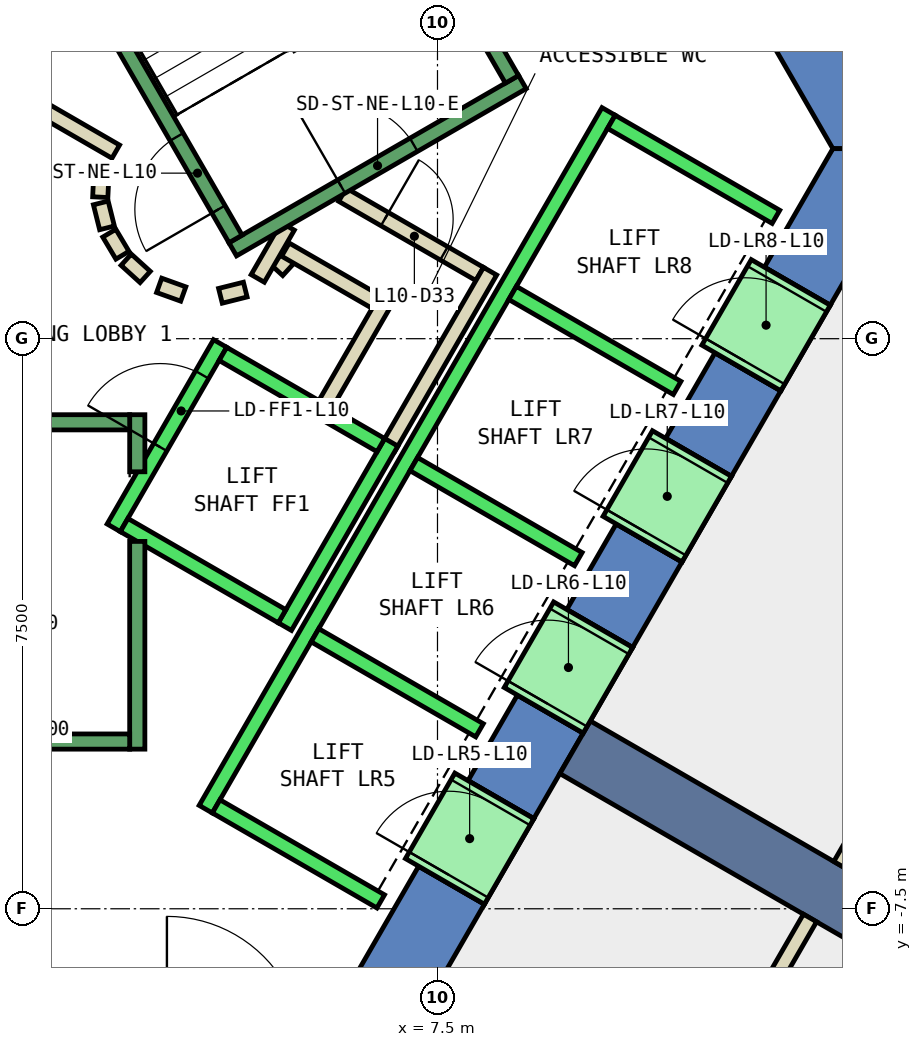
"""IFC4 building model, lengths in metres.
Left out: names, types, materials, properties, quantities, classifications, styles, units other than length and angle.
Written with IfcOpenShell. Run it as: python <this file> out.ifc"""

import sys

from ifc_helpers import new_model, si_unit, direction, frame, frame_2d, origin, place, context, subcontext, project, spatial, polyline, rectangle, outline, extrude, element, fill, save


model = new_model("IFC4")
c1 = context("Model", 3, precision=1e-05, world=origin(), true_north=direction((0.0, 1.0)))
c2 = subcontext(c1, "Body", "Model", "MODEL_VIEW")
j1 = project(units=[si_unit("LENGTHUNIT", "METRE"), si_unit("PLANEANGLEUNIT", "RADIAN")], contexts=[c1])
p1 = place(None, origin())
s1 = spatial("IfcSite", under=j1, at=p1, CompositionType="ELEMENT")
p2 = place(p1, origin())
s2 = spatial("IfcBuilding", under=s1, at=p2, CompositionType="ELEMENT")
p3 = place(p2, frame((0.0, 0.0, 51.8)))
s3 = spatial("IfcBuildingStorey", under=s2, at=p3, CompositionType="ELEMENT", Elevation=51.8)
p4 = place(p3, frame((0.0, 0.0, -0.4)))
e1 = element("IfcWall", 1, at=p4, inside=s3, PredefinedType="SHEAR", context=c2, shape_type="SweptSolid", body=[
    extrude(outline(polyline([(8.517, 11.748), (7.651, 11.248), (12.702, 2.5), (13.856, 2.5), (8.517, 11.748)])), origin(), (0.0, 0.0, 1.0), 4.2),
])
p5 = place(p3, frame((0.0, 0.0, -0.4)))
e2 = element("IfcWall", 2, at=p5, inside=s3, PredefinedType="SHEAR", context=c2, shape_type="SweptSolid", body=[
    extrude(outline(polyline([(8.117, -7.44), (7.252, -6.94), (6.351, -8.5), (6.928, -9.5), (8.117, -7.44)])), origin(), (0.0, 0.0, 1.0), 4.2),
])
p6 = place(p3, frame((0.0, 0.0, -0.4)))
e3 = element("IfcWall", 3, at=p6, inside=s3, PredefinedType="SHEAR", context=c2, shape_type="SweptSolid", body=[
    extrude(outline(polyline([(9.417, -5.189), (8.551, -4.689), (7.902, -5.814), (8.767, -6.314), (9.417, -5.189)])), origin(), (0.0, 0.0, 1.0), 4.2),
])
p7 = place(p3, frame((0.0, 0.0, -0.4)))
e4 = element("IfcWall", 4, at=p7, inside=s3, PredefinedType="SHEAR", context=c2, shape_type="SweptSolid", body=[
    extrude(outline(polyline([(10.717, -2.937), (9.851, -2.437), (9.201, -3.563), (10.067, -4.063), (10.717, -2.937)])), origin(), (0.0, 0.0, 1.0), 4.2),
])
p8 = place(p3, frame((0.0, 0.0, -0.4)))
e5 = element("IfcWall", 5, at=p8, inside=s3, PredefinedType="SHEAR", context=c2, shape_type="SweptSolid", body=[
    extrude(outline(polyline([(12.017, -0.686), (11.151, -0.186), (10.501, -1.311), (11.367, -1.811), (12.017, -0.686)])), origin(), (0.0, 0.0, 1.0), 4.2),
])
p9 = place(p3, frame((0.0, 0.0, -0.4)))
e6 = element("IfcWall", 6, at=p9, inside=s3, PredefinedType="SHEAR", context=c2, shape_type="SweptSolid", body=[
    extrude(outline(polyline([(11.801, 0.94), (12.667, 0.44), (13.856, 2.5), (12.702, 2.5), (11.801, 0.94)])), origin(), (0.0, 0.0, 1.0), 4.2),
])
p10 = place(p3, frame((0.0, 0.0, 3.6)))
e7 = element("IfcWall", 7, at=p10, inside=s3, PredefinedType="SHEAR", context=c2, shape_type="SweptSolid", body=[
    extrude(outline(polyline([(8.767, -6.314), (7.902, -5.814), (7.252, -6.94), (8.117, -7.44), (8.767, -6.314)])), origin(), (0.0, 0.0, 1.0), 0.2),
])
p11 = place(p3, frame((0.0, 0.0, 3.6)))
e8 = element("IfcWall", 8, at=p11, inside=s3, PredefinedType="SHEAR", context=c2, shape_type="SweptSolid", body=[
    extrude(outline(polyline([(10.067, -4.063), (9.201, -3.563), (8.551, -4.689), (9.417, -5.189), (10.067, -4.063)])), origin(), (0.0, 0.0, 1.0), 0.2),
])
p12 = place(p3, frame((0.0, 0.0, 3.6)))
e9 = element("IfcWall", 9, at=p12, inside=s3, PredefinedType="SHEAR", context=c2, shape_type="SweptSolid", body=[
    extrude(outline(polyline([(11.367, -1.811), (10.501, -1.311), (9.851, -2.437), (10.717, -2.937), (11.367, -1.811)])), origin(), (0.0, 0.0, 1.0), 0.2),
])
p13 = place(p3, frame((0.0, 0.0, 3.6)))
e10 = element("IfcWall", 10, at=p13, inside=s3, PredefinedType="SHEAR", context=c2, shape_type="SweptSolid", body=[
    extrude(outline(polyline([(12.667, 0.44), (11.801, 0.94), (11.151, -0.186), (12.017, -0.686), (12.667, 0.44)])), origin(), (0.0, 0.0, 1.0), 0.2),
])
p14 = place(p3, frame((9.31, -5.375, -0.4), z_axis=(0.0, 0.0, 1.0), x_axis=(0.866017533419, -0.500013631625, 0.0)))
e11 = element("IfcWall", 11, at=p14, inside=s3, PredefinedType="SHEAR", context=c2, shape_type="SweptSolid", body=[
    extrude(rectangle(XDim=9.0, YDim=0.8, at=frame_2d((4.5, 0.0))), origin(), (0.0, 0.0, 1.0), 4.2),
])
p15 = place(p3, frame((5.39, 0.898, 0.0), z_axis=(0.0, 0.0, 1.0), x_axis=(0.673828488714, 0.738887791073, 0.0)))
e12 = element("IfcWall", 12, at=p15, inside=s3, PredefinedType="PARTITIONING", context=c2, shape_type="SweptSolid", body=[
    extrude(rectangle(XDim=0.263, YDim=0.2, at=frame_2d((0.131, 0.0))), origin(), (0.0, 0.0, 1.0), 3.8),
])
p16 = place(p3, frame((5.499, 1.172, 0.0), z_axis=(0.0, 0.0, 1.0), x_axis=(0.866333505267, -0.499465972466, 0.0)))
e13 = element("IfcWall", 13, at=p16, inside=s3, PredefinedType="PARTITIONING", context=c2, shape_type="SweptSolid", body=[
    extrude(rectangle(XDim=1.374, YDim=0.2, at=frame_2d((0.687, 0.0))), origin(), (0.0, 0.0, 1.0), 3.8),
])
p17 = place(p3, frame((6.826, 0.522, 0.0), z_axis=(0.0, 0.0, 1.0), x_axis=(-0.500016722714, -0.866015748706, 0.0)))
e14 = element("IfcWall", 14, at=p17, inside=s3, PredefinedType="PARTITIONING", context=c2, shape_type="SweptSolid", body=[
    extrude(rectangle(XDim=1.7, YDim=0.2, at=frame_2d((0.85, 0.0))), origin(), (0.0, 0.0, 1.0), 3.8),
])
p18 = place(p3, frame((6.25, 1.894, 0.0), z_axis=(0.0, 0.0, 1.0), x_axis=(0.866043184279, -0.499969202016, 0.0)))
e15 = element("IfcWall", 15, at=p18, inside=s3, PredefinedType="PARTITIONING", context=c2, shape_type="SweptSolid", body=[
    extrude(rectangle(XDim=2.084, YDim=0.2, at=frame_2d((1.042, 0.0))), origin(), (0.0, 0.0, 1.0), 3.8),
])
p19 = place(p18, frame((0.642, 0.0, 0.0)))
e16 = element("IfcOpeningElement", 16, at=p19, cuts=e15, PredefinedType="OPENING", context=c2, shape_type="SweptSolid", body=[
    extrude(rectangle(XDim=0.9, YDim=2.1, at=frame_2d((0.45, 1.05))), frame((0.0, 0.11, 0.0), z_axis=(0.0, -1.0, 0.0), x_axis=(1.0, 0.0, 0.0)), (0.0, 0.0, 1.0), 0.22),
])
p20 = place(p3, frame((8.192, 0.888, 0.0), z_axis=(0.0, 0.0, 1.0), x_axis=(-0.499940625693, -0.866059680843, 0.0)))
e17 = element("IfcWall", 17, at=p20, inside=s3, PredefinedType="PARTITIONING", context=c2, shape_type="SweptSolid", body=[
    extrude(rectangle(XDim=2.68, YDim=0.2, at=frame_2d((1.34, 0.0))), origin(), (0.0, 0.0, 1.0), 3.8),
])
p21 = place(p3, frame((5.135, 0.793, 0.0), z_axis=(0.0, 0.0, 1.0), x_axis=(0.499526442893, 0.866298639529, 0.0)))
e18 = element("IfcWall", 18, at=p21, inside=s3, PredefinedType="PARTITIONING", context=c2, shape_type="SweptSolid", body=[
    extrude(rectangle(XDim=0.791, YDim=0.2, at=frame_2d((0.396, 0.0))), origin(), (0.0, 0.0, 1.0), 3.8),
])
p22 = place(p3, frame((2.012, 3.186, 0.0), z_axis=(0.0, 0.0, 1.0), x_axis=(0.865891012941, -0.500232699559, 0.0)))
e19 = element("IfcWall", 19, at=p22, inside=s3, PredefinedType="PARTITIONING", context=c2, shape_type="SweptSolid", body=[
    extrude(rectangle(XDim=1.449, YDim=0.2, at=frame_2d((0.725, 0.0))), origin(), (0.0, 0.0, 1.0), 3.8),
])
p23 = place(p3, frame((3.079, 2.199, 0.0), z_axis=(0.0, 0.0, 1.0), x_axis=(-0.047771483479, -0.998858290933, 0.0)))
e20 = element("IfcWall", 20, at=p23, inside=s3, PredefinedType="PARTITIONING", context=c2, shape_type="SweptSolid", body=[
    extrude(rectangle(XDim=0.337, YDim=0.2, at=frame_2d((0.169, 0.0))), origin(), (0.0, 0.0, 1.0), 3.8),
])
p24 = place(p3, frame((3.07, 1.786, 0.0), z_axis=(0.0, 0.0, 1.0), x_axis=(0.242705583207, -0.970099994784, 0.0)))
e21 = element("IfcWall", 21, at=p24, inside=s3, PredefinedType="PARTITIONING", context=c2, shape_type="SweptSolid", body=[
    extrude(rectangle(XDim=0.338, YDim=0.2, at=frame_2d((0.169, 0.0))), origin(), (0.0, 0.0, 1.0), 3.8),
])
for number, where, z_axis, x_axis in (
    (22, (3.182, 1.388, 0.0), (0.0, 0.0, 1.0), (0.512, -0.859, 0.0)),
    (23, (3.404, 1.039, 0.0), (0.0, 0.0, 1.0), (0.74, -0.672, 0.0)),
):
    element("IfcWall", number, at=place(p3, frame(where, z_axis=z_axis, x_axis=x_axis)), inside=s3, PredefinedType="PARTITIONING", context=c2, shape_type="SweptSolid", body=[
        extrude(rectangle(XDim=0.338, YDim=0.2, at=frame_2d((0.169, 0.0))), origin(), (0.0, 0.0, 1.0), 3.8),
    ])
p25 = place(p3, frame((3.838, 0.702, 0.0), z_axis=(0.0, 0.0, 1.0), x_axis=(0.941035081519, -0.338308993895, 0.0)))
e24 = element("IfcWall", 24, at=p25, inside=s3, PredefinedType="PARTITIONING", context=c2, shape_type="SweptSolid", body=[
    extrude(rectangle(XDim=0.337, YDim=0.2, at=frame_2d((0.168, 0.0))), origin(), (0.0, 0.0, 1.0), 3.8),
])
p26 = place(p3, frame((4.644, 0.564, 0.0), z_axis=(0.0, 0.0, 1.0), x_axis=(0.969929076366, 0.243387729394, 0.0)))
e25 = element("IfcWall", 25, at=p26, inside=s3, PredefinedType="PARTITIONING", context=c2, shape_type="SweptSolid", body=[
    extrude(rectangle(XDim=0.337, YDim=0.2, at=frame_2d((0.168, 0.0))), origin(), (0.0, 0.0, 1.0), 3.8),
])
p27 = place(p3, frame((19.257, 4.255, 0.0), z_axis=(0.0, 0.0, 1.0), x_axis=(-0.499978317034, -0.866037922089, 0.0)))
e26 = element("IfcWall", 26, at=p27, inside=s3, PredefinedType="PARTITIONING", context=c2, shape_type="SweptSolid", body=[
    extrude(rectangle(XDim=12.913, YDim=0.2, at=frame_2d((6.456, 0.0))), origin(), (0.0, 0.0, 1.0), 3.8),
])
p28 = place(p3, frame((12.401, -7.621, 0.0), z_axis=(0.0, 0.0, 1.0), x_axis=(-0.499983724212, -0.866034800411, 0.0)))
e27 = element("IfcWall", 27, at=p28, inside=s3, PredefinedType="PARTITIONING", context=c2, shape_type="SweptSolid", body=[
    extrude(rectangle(XDim=9.302, YDim=0.2, at=frame_2d((4.651, 0.0))), origin(), (0.0, 0.0, 1.0), 3.8),
])
p29 = place(p3, frame((3.24, -2.488, 0.0), z_axis=(0.0, 0.0, 1.0), x_axis=(0.49994636267, 0.866056369097, 0.0)))
e28 = element("IfcWall", 28, at=p29, inside=s3, PredefinedType="STANDARD", context=c2, shape_type="SweptSolid", body=[
    extrude(rectangle(XDim=2.8, YDim=0.2, at=frame_2d((1.4, 0.0))), origin(), (0.0, 0.0, 1.0), 3.8),
])
p30 = place(p29, frame((1.225, 0.0, 0.0)))
e29 = element("IfcOpeningElement", 29, at=p30, cuts=e28, PredefinedType="OPENING", context=c2, shape_type="SweptSolid", body=[
    extrude(rectangle(XDim=1.1, YDim=2.1, at=frame_2d((0.55, 1.05))), frame((0.0, 0.11, 0.0), z_axis=(0.0, -1.0, 0.0), x_axis=(1.0, 0.0, 0.0)), (0.0, 0.0, 1.0), 0.22),
])
p31 = place(p3, frame((5.492, -3.788, 0.0), z_axis=(0.0, 0.0, 1.0), x_axis=(0.500011755427, 0.866018616679, 0.0)))
e30 = element("IfcWall", 30, at=p31, inside=s3, PredefinedType="STANDARD", context=c2, shape_type="SweptSolid", body=[
    extrude(rectangle(XDim=2.8, YDim=0.2, at=frame_2d((1.4, 0.0))), origin(), (0.0, 0.0, 1.0), 3.8),
])
p32 = place(p3, frame((3.377, -2.452, 0.0), z_axis=(0.0, 0.0, 1.0), x_axis=(0.865955154139, -0.50012165622, 0.0)))
e31 = element("IfcWall", 31, at=p32, inside=s3, PredefinedType="STANDARD", context=c2, shape_type="SweptSolid", body=[
    extrude(rectangle(XDim=2.4, YDim=0.2, at=frame_2d((1.2, 0.0))), origin(), (0.0, 0.0, 1.0), 3.8),
])
p33 = place(p3, frame((4.677, -0.2, 0.0), z_axis=(0.0, 0.0, 1.0), x_axis=(0.865973769406, -0.500089422704, 0.0)))
e32 = element("IfcWall", 32, at=p33, inside=s3, PredefinedType="STANDARD", context=c2, shape_type="SweptSolid", body=[
    extrude(rectangle(XDim=2.399, YDim=0.2, at=frame_2d((1.2, 0.0))), origin(), (0.0, 0.0, 1.0), 3.8),
])
p34 = place(p3, frame((4.451, -6.19, 0.0), z_axis=(0.0, 0.0, 1.0), x_axis=(0.50000090737, 0.866024879913, 0.0)))
e33 = element("IfcWall", 33, at=p34, inside=s3, PredefinedType="STANDARD", context=c2, shape_type="SweptSolid", body=[
    extrude(rectangle(XDim=10.6, YDim=0.2, at=frame_2d((5.3, 0.0))), origin(), (0.0, 0.0, 1.0), 3.8),
])
for number, where, z_axis, x_axis in (
    (34, (4.588, -6.153, 0.0), (0.0, 0.0, 1.0), (0.866, -0.5, 0.0)),
    (35, (5.888, -3.902, 0.0), (0.0, 0.0, 1.0), (0.866, -0.5, 0.0)),
    (36, (7.188, -1.65, 0.0), (0.0, 0.0, 1.0), (0.866, -0.5, 0.0)),
    (37, (8.488, 0.602, 0.0), (0.0, 0.0, 1.0), (0.866, -0.5, 0.0)),
):
    element("IfcWall", number, at=place(p3, frame(where, z_axis=z_axis, x_axis=x_axis)), inside=s3, PredefinedType="STANDARD", context=c2, shape_type="SweptSolid", body=[
        extrude(rectangle(XDim=2.5, YDim=0.2, at=frame_2d((1.25, 0.0))), origin(), (0.0, 0.0, 1.0), 3.8),
    ])
p35 = place(p3, frame((9.788, 2.853, 0.0), z_axis=(0.0, 0.0, 1.0), x_axis=(0.865998541277, -0.500046524342, 0.0)))
e38 = element("IfcWall", 38, at=p35, inside=s3, PredefinedType="STANDARD", context=c2, shape_type="SweptSolid", body=[
    extrude(rectangle(XDim=2.5, YDim=0.2, at=frame_2d((1.25, 0.0))), origin(), (0.0, 0.0, 1.0), 3.8),
])
p36 = place(p3, frame((7.598, -7.14, 0.0), z_axis=(0.0, 0.0, 1.0), x_axis=(0.500362116554, 0.865816234728, 0.0)))
e39 = element("IfcWall", 39, at=p36, inside=s3, PredefinedType="STANDARD", context=c2, shape_type="SweptSolid", body=[
    extrude(rectangle(XDim=1.299, YDim=1.2, at=frame_2d((0.65, 0.0))), origin(), (0.0, 0.0, 1.0), 2.4),
])
p37 = place(p36, frame((0.1, 0.0, 0.0)))
e40 = element("IfcOpeningElement", 40, at=p37, cuts=e39, PredefinedType="OPENING", context=c2, shape_type="SweptSolid", body=[
    extrude(rectangle(XDim=1.1, YDim=2.3, at=frame_2d((0.55, 1.15))), frame((0.0, 0.61, 0.0), z_axis=(0.0, -1.0, 0.0), x_axis=(1.0, 0.0, 0.0)), (0.0, 0.0, 1.0), 1.22),
])
p38 = place(p3, frame((8.898, -4.889, 0.0), z_axis=(0.0, 0.0, 1.0), x_axis=(0.500036693733, 0.866004217611, 0.0)))
e41 = element("IfcWall", 41, at=p38, inside=s3, PredefinedType="STANDARD", context=c2, shape_type="SweptSolid", body=[
    extrude(rectangle(XDim=1.3, YDim=1.2, at=frame_2d((0.65, 0.0))), origin(), (0.0, 0.0, 1.0), 2.4),
])
p39 = place(p38, frame((0.1, 0.0, 0.0)))
e42 = element("IfcOpeningElement", 42, at=p39, cuts=e41, PredefinedType="OPENING", context=c2, shape_type="SweptSolid", body=[
    extrude(rectangle(XDim=1.1, YDim=2.3, at=frame_2d((0.55, 1.15))), frame((0.0, 0.61, 0.0), z_axis=(0.0, -1.0, 0.0), x_axis=(1.0, 0.0, 0.0)), (0.0, 0.0, 1.0), 1.22),
])
p40 = place(p3, frame((10.198, -2.637, 0.0), z_axis=(0.0, 0.0, 1.0), x_axis=(0.49989585183, 0.866085525409, 0.0)))
e43 = element("IfcWall", 43, at=p40, inside=s3, PredefinedType="STANDARD", context=c2, shape_type="SweptSolid", body=[
    extrude(rectangle(XDim=1.3, YDim=1.2, at=frame_2d((0.65, 0.0))), origin(), (0.0, 0.0, 1.0), 2.4),
])
p41 = place(p40, frame((0.1, 0.0, 0.0)))
e44 = element("IfcOpeningElement", 44, at=p41, cuts=e43, PredefinedType="OPENING", context=c2, shape_type="SweptSolid", body=[
    extrude(rectangle(XDim=1.1, YDim=2.3, at=frame_2d((0.55, 1.15))), frame((0.0, 0.61, 0.0), z_axis=(0.0, -1.0, 0.0), x_axis=(1.0, 0.0, 0.0)), (0.0, 0.0, 1.0), 1.22),
])
p42 = place(p3, frame((11.498, -0.385, 0.0), z_axis=(0.0, 0.0, 1.0), x_axis=(0.500221244143, 0.865897630733, 0.0)))
e45 = element("IfcWall", 45, at=p42, inside=s3, PredefinedType="STANDARD", context=c2, shape_type="SweptSolid", body=[
    extrude(rectangle(XDim=1.299, YDim=1.2, at=frame_2d((0.65, 0.0))), origin(), (0.0, 0.0, 1.0), 2.4),
])
p43 = place(p42, frame((0.1, 0.0, 0.0)))
e46 = element("IfcOpeningElement", 46, at=p43, cuts=e45, PredefinedType="OPENING", context=c2, shape_type="SweptSolid", body=[
    extrude(rectangle(XDim=1.1, YDim=2.3, at=frame_2d((0.55, 1.15))), frame((0.0, 0.61, 0.0), z_axis=(0.0, -1.0, 0.0), x_axis=(1.0, 0.0, 0.0)), (0.0, 0.0, 1.0), 1.22),
])
p44 = place(p3, frame((3.55, -2.667, 0.0), z_axis=(0.0, 0.0, 1.0), x_axis=(0.0, -1.0, 0.0)))
e47 = element("IfcWall", 47, at=p44, inside=s3, PredefinedType="STANDARD", context=c2, shape_type="SweptSolid", body=[
    extrude(rectangle(XDim=2.733, YDim=0.2, at=frame_2d((1.366, 0.0))), origin(), (0.0, 0.0, 1.0), 3.8),
])
p45 = place(p3, frame((3.55, -1.0, 0.0), z_axis=(0.0, 0.0, 1.0), x_axis=(0.0, -1.0, 0.0)))
e48 = element("IfcWall", 48, at=p45, inside=s3, PredefinedType="STANDARD", context=c2, shape_type="SweptSolid", body=[
    extrude(rectangle(XDim=0.751, YDim=0.2, at=frame_2d((0.375, 0.0))), origin(), (0.0, 0.0, 1.0), 3.8),
])
p46 = place(p3, frame((-3.45, -1.1, 0.0), z_axis=(0.0, 0.0, 1.0), x_axis=(1.0, 0.0, 0.0)))
e49 = element("IfcWall", 49, at=p46, inside=s3, PredefinedType="STANDARD", context=c2, shape_type="SweptSolid", body=[
    extrude(rectangle(XDim=6.9, YDim=0.2, at=frame_2d((3.45, 0.0))), origin(), (0.0, 0.0, 1.0), 3.8),
])
p47 = place(p46, frame((0.45, 0.0, 0.0)))
e50 = element("IfcOpeningElement", 50, at=p47, cuts=e49, PredefinedType="OPENING", context=c2, shape_type="SweptSolid", body=[
    extrude(rectangle(XDim=1.1, YDim=2.2, at=frame_2d((0.55, 1.1))), frame((0.0, 0.11, 0.0), z_axis=(0.0, -1.0, 0.0), x_axis=(1.0, 0.0, 0.0)), (0.0, 0.0, 1.0), 0.22),
])
p48 = place(p3, frame((-3.45, -5.3, 0.0), z_axis=(0.0, 0.0, 1.0), x_axis=(1.0, 0.0, 0.0)))
e51 = element("IfcWall", 51, at=p48, inside=s3, PredefinedType="STANDARD", context=c2, shape_type="SweptSolid", body=[
    extrude(rectangle(XDim=6.9, YDim=0.2, at=frame_2d((3.45, 0.0))), origin(), (0.0, 0.0, 1.0), 3.8),
])
p49 = place(p3, frame((4.806, 1.176, 0.0), z_axis=(0.0, 0.0, 1.0), x_axis=(0.866059941101, 0.499940174841, 0.0)))
e52 = element("IfcWall", 52, at=p49, inside=s3, PredefinedType="STANDARD", context=c2, shape_type="SweptSolid", body=[
    extrude(rectangle(XDim=4.4, YDim=0.2, at=frame_2d((2.2, 0.0))), origin(), (0.0, 0.0, 1.0), 3.8),
])
p50 = place(p49, frame((1.65, 0.0, 0.0)))
e53 = element("IfcOpeningElement", 53, at=p50, cuts=e52, PredefinedType="OPENING", context=c2, shape_type="SweptSolid", body=[
    extrude(rectangle(XDim=1.1, YDim=2.2, at=frame_2d((0.55, 1.1))), frame((0.0, 0.11, 0.0), z_axis=(0.0, -1.0, 0.0), x_axis=(1.0, 0.0, 0.0)), (0.0, 0.0, 1.0), 0.22),
])
p51 = place(p3, frame((4.843, 1.312, 0.0), z_axis=(0.0, 0.0, 1.0), x_axis=(-0.499963383562, 0.866046543262, 0.0)))
e54 = element("IfcWall", 54, at=p51, inside=s3, PredefinedType="STANDARD", context=c2, shape_type="SweptSolid", body=[
    extrude(rectangle(XDim=6.9, YDim=0.2, at=frame_2d((3.45, 0.0))), origin(), (0.0, 0.0, 1.0), 3.8),
])
p52 = place(p51, frame((0.45, 0.0, 0.0)))
e55 = element("IfcOpeningElement", 55, at=p52, cuts=e54, PredefinedType="OPENING", context=c2, shape_type="SweptSolid", body=[
    extrude(rectangle(XDim=1.1, YDim=2.2, at=frame_2d((0.55, 1.1))), frame((0.0, 0.11, 0.0), z_axis=(0.0, -1.0, 0.0), x_axis=(1.0, 0.0, 0.0)), (0.0, 0.0, 1.0), 0.22),
])
p53 = place(p3, frame((8.48, 3.412, 0.0), z_axis=(0.0, 0.0, 1.0), x_axis=(-0.499978703459, 0.866037698999, 0.0)))
e56 = element("IfcWall", 56, at=p53, inside=s3, PredefinedType="STANDARD", context=c2, shape_type="SweptSolid", body=[
    extrude(rectangle(XDim=6.9, YDim=0.2, at=frame_2d((3.45, 0.0))), origin(), (0.0, 0.0, 1.0), 3.8),
])
p54 = place(p19, origin())
e57 = element("IfcDoor", 57, at=p54, inside=s3, OperationType="SINGLE_SWING_LEFT", PredefinedType="DOOR", context=c2, shape_type="SweptSolid", body=[
    extrude(rectangle(XDim=0.9, YDim=2.1, at=frame_2d((0.45, 1.05))), frame((0.0, 0.025, 0.0), z_axis=(0.0, -1.0, 0.0), x_axis=(1.0, 0.0, 0.0)), (0.0, 0.0, 1.0), 0.05),
])
fill(e16, e57)
p55 = place(p37, origin())
e58 = element("IfcDoor", 58, at=p55, inside=s3, OperationType="SLIDING_TO_LEFT", PredefinedType="DOOR", context=c2, shape_type="SweptSolid", body=[
    extrude(rectangle(XDim=1.1, YDim=2.3, at=frame_2d((0.55, 1.15))), frame((0.0, 0.025, 0.0), z_axis=(0.0, -1.0, 0.0), x_axis=(1.0, 0.0, 0.0)), (0.0, 0.0, 1.0), 0.05),
])
fill(e40, e58)
p56 = place(p39, origin())
e59 = element("IfcDoor", 59, at=p56, inside=s3, OperationType="SLIDING_TO_LEFT", PredefinedType="DOOR", context=c2, shape_type="SweptSolid", body=[
    extrude(rectangle(XDim=1.1, YDim=2.3, at=frame_2d((0.55, 1.15))), frame((0.0, 0.025, 0.0), z_axis=(0.0, -1.0, 0.0), x_axis=(1.0, 0.0, 0.0)), (0.0, 0.0, 1.0), 0.05),
])
fill(e42, e59)
p57 = place(p41, origin())
e60 = element("IfcDoor", 60, at=p57, inside=s3, OperationType="SLIDING_TO_LEFT", PredefinedType="DOOR", context=c2, shape_type="SweptSolid", body=[
    extrude(rectangle(XDim=1.1, YDim=2.3, at=frame_2d((0.55, 1.15))), frame((0.0, 0.025, 0.0), z_axis=(0.0, -1.0, 0.0), x_axis=(1.0, 0.0, 0.0)), (0.0, 0.0, 1.0), 0.05),
])
fill(e44, e60)
p58 = place(p43, origin())
e61 = element("IfcDoor", 61, at=p58, inside=s3, OperationType="SLIDING_TO_LEFT", PredefinedType="DOOR", context=c2, shape_type="SweptSolid", body=[
    extrude(rectangle(XDim=1.1, YDim=2.3, at=frame_2d((0.55, 1.15))), frame((0.0, 0.025, 0.0), z_axis=(0.0, -1.0, 0.0), x_axis=(1.0, 0.0, 0.0)), (0.0, 0.0, 1.0), 0.05),
])
fill(e46, e61)
p59 = place(p30, origin())
e62 = element("IfcDoor", 62, at=p59, inside=s3, OperationType="SLIDING_TO_LEFT", PredefinedType="DOOR", context=c2, shape_type="SweptSolid", body=[
    extrude(rectangle(XDim=1.1, YDim=2.1, at=frame_2d((0.55, 1.05))), frame((0.0, 0.025, 0.0), z_axis=(0.0, -1.0, 0.0), x_axis=(1.0, 0.0, 0.0)), (0.0, 0.0, 1.0), 0.05),
])
fill(e29, e62)
p60 = place(p52, origin())
e63 = element("IfcDoor", 63, at=p60, inside=s3, OperationType="SINGLE_SWING_LEFT", PredefinedType="DOOR", context=c2, shape_type="SweptSolid", body=[
    extrude(rectangle(XDim=1.1, YDim=2.2, at=frame_2d((0.55, 1.1))), frame((0.0, 0.025, 0.0), z_axis=(0.0, -1.0, 0.0), x_axis=(1.0, 0.0, 0.0)), (0.0, 0.0, 1.0), 0.05),
])
fill(e55, e63)
p61 = place(p50, origin())
e64 = element("IfcDoor", 64, at=p61, inside=s3, OperationType="SINGLE_SWING_LEFT", PredefinedType="DOOR", context=c2, shape_type="SweptSolid", body=[
    extrude(rectangle(XDim=1.1, YDim=2.2, at=frame_2d((0.55, 1.1))), frame((0.0, 0.025, 0.0), z_axis=(0.0, -1.0, 0.0), x_axis=(1.0, 0.0, 0.0)), (0.0, 0.0, 1.0), 0.05),
])
fill(e53, e64)
save(model, sys.argv[1])
